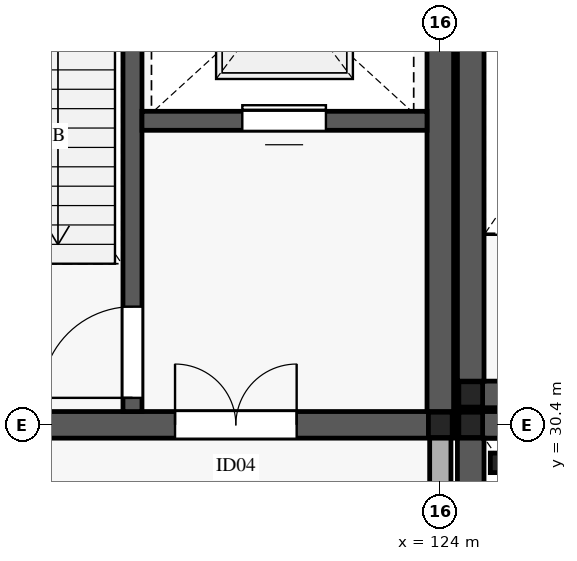
"""IFC4 building model, lengths in metres.
Left out: names, types, materials, properties, quantities, classifications, styles, units other than length and angle.
Written with IfcOpenShell. Run it as: python <this file> out.ifc"""

import sys

from ifc_helpers import new_model, si_unit, direction, frame, frame_2d, origin, origin_2d, place, context, subcontext, project, spatial, rectangle, i_section, extrude, element, fill, save


model = new_model("IFC4")
c1 = context("Model", 3, precision=1e-05, world=origin(), true_north=direction((0.0, 1.0)))
c2 = subcontext(c1, "Body", "Model", "MODEL_VIEW")
j1 = project(units=[si_unit("LENGTHUNIT", "METRE"), si_unit("PLANEANGLEUNIT", "RADIAN")], contexts=[c1])
p1 = place(None, origin())
s1 = spatial("IfcSite", under=j1, at=p1, CompositionType="ELEMENT")
p2 = place(p1, origin())
s2 = spatial("IfcBuilding", under=s1, at=p2, CompositionType="ELEMENT")
p3 = place(p2, frame((0.0, 0.0, 5.4)))
s3 = spatial("IfcBuildingStorey", under=s2, at=p3, CompositionType="ELEMENT", Elevation=5.4)
for number, where, z_axis, x_axis in (
    (1, (124.4, 30.4, 0.0), (0.0, 0.0, 1.0), (1.0, 0.0, 0.0)),
    (2, (124.4, 30.8, 0.0), (0.0, 0.0, 1.0), (1.0, 0.0, 0.0)),
    (3, (124.0, 30.4, 0.0), (0.0, 0.0, 1.0), (1.0, 0.0, 0.0)),
):
    element("IfcColumn", number, at=place(p3, frame(where, z_axis=z_axis, x_axis=x_axis)), inside=s3, PredefinedType="COLUMN", context=c2, shape_type="SweptSolid", body=[
        extrude(i_section(OverallWidth=0.313, OverallDepth=0.333, WebThickness=0.018, FlangeThickness=0.028, FilletRadius=0.015, at=origin_2d()), origin(), (0.0, 0.0, 1.0), 5.185),
    ])
p4 = place(p3, frame((124.0, 30.42, 0.0), z_axis=(0.0, 0.0, 1.0), x_axis=(0.0, -1.0, 0.0)))
e4 = element("IfcWall", 4, at=p4, inside=s3, PredefinedType="STANDARD", context=c2, shape_type="SweptSolid", body=[
    extrude(rectangle(XDim=7.64, YDim=0.28, at=frame_2d((3.82, 0.0))), origin(), (0.0, 0.0, 1.0), 4.25),
])
p5 = place(p4, frame((2.37, 0.0, 0.75)))
e5 = element("IfcOpeningElement", 5, at=p5, cuts=e4, PredefinedType="OPENING", context=c2, shape_type="SweptSolid", body=[
    extrude(rectangle(XDim=2.9, YDim=2.15, at=frame_2d((1.45, 1.075))), frame((0.0, 0.15, 0.0), z_axis=(0.0, -1.0, 0.0), x_axis=(1.0, 0.0, 0.0)), (0.0, 0.0, 1.0), 0.3),
])
p6 = place(p3, frame((124.225, 30.4, 0.0), z_axis=(0.0, 0.0, 1.0), x_axis=(1.0, 0.0, 0.0)))
e6 = element("IfcWall", 6, at=p6, inside=s3, PredefinedType="SHEAR", context=c2, shape_type="SweptSolid", body=[
    extrude(rectangle(XDim=7.95, YDim=0.35, at=frame_2d((3.975, 0.0))), origin(), (0.0, 0.0, 1.0), 5.19),
])
p7 = place(p3, frame((124.4, 22.975, 0.0), z_axis=(0.0, 0.0, 1.0), x_axis=(0.0, 1.0, 0.0)))
e7 = element("IfcWall", 7, at=p7, inside=s3, PredefinedType="SHEAR", context=c2, shape_type="SweptSolid", body=[
    extrude(rectangle(XDim=7.25, YDim=0.35, at=frame_2d((3.625, 0.0))), origin(), (0.0, 0.0, 1.0), 5.19),
])
p8 = place(p3, frame((124.76, 29.9, 0.0), z_axis=(0.0, 0.0, 1.0), x_axis=(1.0, 0.0, 0.0)))
e8 = element("IfcColumn", 8, at=p8, inside=s3, PredefinedType="COLUMN", context=c2, shape_type="SweptSolid", body=[
    extrude(i_section(OverallWidth=0.204, OverallDepth=0.257, WebThickness=0.009, FlangeThickness=0.016, FilletRadius=0.013, at=origin_2d()), origin(), (0.0, 0.0, 1.0), 5.395),
])
p9 = place(p3, frame((124.225, 30.8, 0.0), z_axis=(0.0, 0.0, 1.0), x_axis=(1.0, 0.0, 0.0)))
e9 = element("IfcWall", 9, at=p9, inside=s3, PredefinedType="SHEAR", context=c2, shape_type="SweptSolid", body=[
    extrude(rectangle(XDim=7.95, YDim=0.35, at=frame_2d((3.975, 0.0))), origin(), (0.0, 0.0, 1.0), 5.19),
])
p10 = place(p3, frame((124.4, 30.975, 0.0), z_axis=(0.0, 0.0, 1.0), x_axis=(0.0, 1.0, 0.0)))
e10 = element("IfcWall", 10, at=p10, inside=s3, PredefinedType="SHEAR", context=c2, shape_type="SweptSolid", body=[
    extrude(rectangle(XDim=6.85, YDim=0.35, at=frame_2d((3.425, 0.0))), origin(), (0.0, 0.0, 1.0), 5.19),
])
p11 = place(p3, frame((115.825, 30.4, 0.0), z_axis=(0.0, 0.0, 1.0), x_axis=(1.0, 0.0, 0.0)))
e11 = element("IfcWall", 11, at=p11, inside=s3, PredefinedType="SHEAR", context=c2, shape_type="SweptSolid", body=[
    extrude(rectangle(XDim=8.35, YDim=0.35, at=frame_2d((4.175, 0.0))), origin(), (0.0, 0.0, 1.0), 5.19),
])
p12 = place(p11, frame((4.685, 0.0, 0.0)))
e12 = element("IfcOpeningElement", 12, at=p12, cuts=e11, PredefinedType="OPENING", context=c2, shape_type="SweptSolid", body=[
    extrude(rectangle(XDim=1.6, YDim=2.35, at=frame_2d((0.8, 1.175))), frame((0.0, 0.185, 0.0), z_axis=(0.0, -1.0, 0.0), x_axis=(1.0, 0.0, 0.0)), (0.0, 0.0, 1.0), 0.37),
])
p13 = place(p3, frame((124.0, 30.575, 0.0), z_axis=(0.0, 0.0, 1.0), x_axis=(0.0, 1.0, 0.0)))
e13 = element("IfcWall", 13, at=p13, inside=s3, PredefinedType="SHEAR", context=c2, shape_type="SweptSolid", body=[
    extrude(rectangle(XDim=7.25, YDim=0.35, at=frame_2d((3.625, 0.0))), origin(), (0.0, 0.0, 1.0), 5.19),
])
p14 = place(p3, frame((119.95, 30.575, 0.0), z_axis=(0.0, 0.0, 1.0), x_axis=(0.0, 1.0, 0.0)))
e14 = element("IfcWall", 14, at=p14, inside=s3, PredefinedType="SHEAR", context=c2, shape_type="SweptSolid", body=[
    extrude(rectangle(XDim=7.25, YDim=0.25, at=frame_2d((3.625, 0.0))), origin(), (0.0, 0.0, 1.0), 5.19),
])
p15 = place(p14, frame((0.18, 0.0, 0.0)))
e15 = element("IfcOpeningElement", 15, at=p15, cuts=e14, PredefinedType="OPENING", context=c2, shape_type="SweptSolid", body=[
    extrude(rectangle(XDim=1.2, YDim=2.2, at=frame_2d((0.6, 1.1))), frame((0.0, 0.135, 0.0), z_axis=(0.0, -1.0, 0.0), x_axis=(1.0, 0.0, 0.0)), (0.0, 0.0, 1.0), 0.27),
])
p16 = place(p3, frame((120.075, 34.4, 0.0), z_axis=(0.0, 0.0, 1.0), x_axis=(1.0, 0.0, 0.0)))
e16 = element("IfcWall", 16, at=p16, inside=s3, PredefinedType="SHEAR", context=c2, shape_type="SweptSolid", body=[
    extrude(rectangle(XDim=3.75, YDim=0.25, at=frame_2d((1.875, 0.0))), origin(), (0.0, 0.0, 1.0), 5.19),
])
p17 = place(p16, frame((1.32, 0.0, 0.0)))
e17 = element("IfcOpeningElement", 17, at=p17, cuts=e16, PredefinedType="OPENING", context=c2, shape_type="SweptSolid", body=[
    extrude(rectangle(XDim=1.1, YDim=2.2, at=frame_2d((0.55, 1.1))), frame((0.0, 0.135, 0.0), z_axis=(0.0, -1.0, 0.0), x_axis=(1.0, 0.0, 0.0)), (0.0, 0.0, 1.0), 0.27),
])
p18 = place(p15, origin())
e18 = element("IfcDoor", 18, at=p18, inside=s3, OperationType="SINGLE_SWING_LEFT", PredefinedType="DOOR", context=c2, shape_type="SweptSolid", body=[
    extrude(rectangle(XDim=1.2, YDim=2.2, at=frame_2d((0.6, 1.1))), frame((0.0, 0.025, 0.0), z_axis=(0.0, -1.0, 0.0), x_axis=(1.0, 0.0, 0.0)), (0.0, 0.0, 1.0), 0.05),
])
fill(e15, e18)
p19 = place(p12, origin())
e19 = element("IfcDoor", 19, at=p19, inside=s3, OperationType="DOUBLE_DOOR_SINGLE_SWING", PredefinedType="DOOR", context=c2, shape_type="SweptSolid", body=[
    extrude(rectangle(XDim=1.6, YDim=2.35, at=frame_2d((0.8, 1.175))), frame((0.0, 0.025, 0.0), z_axis=(0.0, -1.0, 0.0), x_axis=(1.0, 0.0, 0.0)), (0.0, 0.0, 1.0), 0.05),
])
fill(e12, e19)
p20 = place(p17, origin())
e20 = element("IfcDoor", 20, at=p20, inside=s3, OperationType="SLIDING_TO_LEFT", PredefinedType="DOOR", context=c2, shape_type="SweptSolid", body=[
    extrude(rectangle(XDim=1.1, YDim=2.2, at=frame_2d((0.55, 1.1))), frame((0.0, 0.025, 0.0), z_axis=(0.0, -1.0, 0.0), x_axis=(1.0, 0.0, 0.0)), (0.0, 0.0, 1.0), 0.05),
])
fill(e17, e20)
save(model, sys.argv[1])
